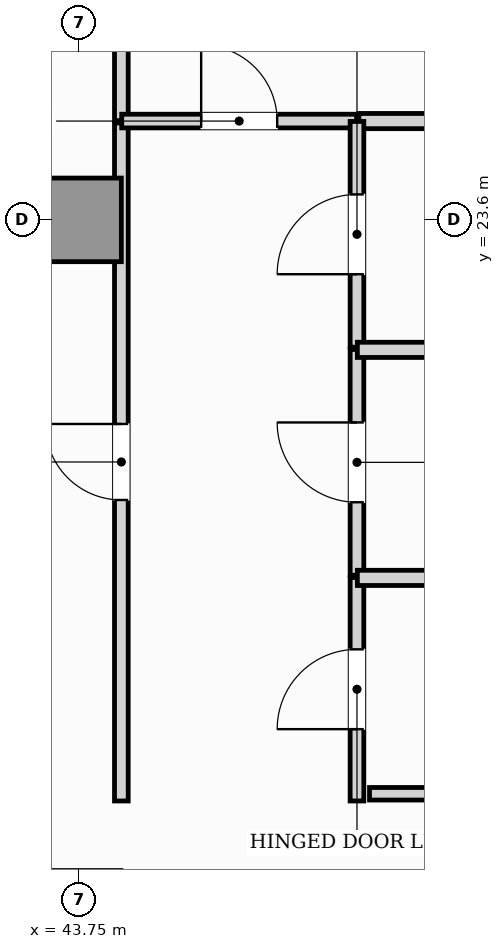
"""IFC4 building model, lengths in metres.
Left out: names, types, materials, properties, quantities, classifications, styles, units other than length and angle.
Written with IfcOpenShell. Run it as: python <this file> out.ifc"""

import sys

from ifc_helpers import new_model, si_unit, direction, frame, frame_2d, origin, origin_2d, place, context, subcontext, project, spatial, rectangle, extrude, element, fill, save


model = new_model("IFC4")
c1 = context("Model", 3, precision=1e-05, world=origin(), true_north=direction((0.0, 1.0)))
c2 = subcontext(c1, "Body", "Model", "MODEL_VIEW")
j1 = project(units=[si_unit("LENGTHUNIT", "METRE"), si_unit("PLANEANGLEUNIT", "RADIAN")], contexts=[c1])
p1 = place(None, origin())
s1 = spatial("IfcSite", under=j1, at=p1, CompositionType="ELEMENT")
p2 = place(p1, origin())
s2 = spatial("IfcBuilding", under=s1, at=p2, CompositionType="ELEMENT")
p3 = place(p2, origin())
s3 = spatial("IfcBuildingStorey", under=s2, at=p3, CompositionType="ELEMENT", Elevation=0.0)
p4 = place(p3, frame((43.75, 23.6, 0.0), z_axis=(0.0, 0.0, 1.0), x_axis=(1.0, 0.0, 0.0)))
e1 = element("IfcColumn", 1, at=p4, inside=s3, PredefinedType="COLUMN", context=c2, shape_type="SweptSolid", body=[
    extrude(rectangle(XDim=1.1, YDim=1.1, at=origin_2d()), origin(), (0.0, 0.0, 1.0), 5.4),
])
p5 = place(p3, frame((44.3, 24.905, 0.0), z_axis=(0.0, 0.0, 1.0), x_axis=(0.0, 1.0, 0.0)))
e2 = element("IfcWall", 2, at=p5, inside=s3, PredefinedType="PARTITIONING", context=c2, shape_type="SweptSolid", body=[
    extrude(rectangle(XDim=18.59, YDim=0.18, at=frame_2d((9.295, 0.0))), origin(), (0.0, 0.0, 1.0), 5.1),
])
p6 = place(p5, frame((6.007, 0.0, 0.0)))
e3 = element("IfcOpeningElement", 3, at=p6, cuts=e2, PredefinedType="OPENING", context=c2, shape_type="SweptSolid", body=[
    extrude(rectangle(XDim=1.0, YDim=2.15, at=frame_2d((0.5, 1.075))), frame((0.0, 0.1, 0.0), z_axis=(0.0, -1.0, 0.0), x_axis=(1.0, 0.0, 0.0)), (0.0, 0.0, 1.0), 0.2),
])
p7 = place(p3, frame((44.3, 15.955, 0.0), z_axis=(0.0, 0.0, 1.0), x_axis=(0.0, 1.0, 0.0)))
e4 = element("IfcWall", 4, at=p7, inside=s3, PredefinedType="PARTITIONING", context=c2, shape_type="SweptSolid", body=[
    extrude(rectangle(XDim=8.92, YDim=0.18, at=frame_2d((4.46, 0.0))), origin(), (0.0, 0.0, 1.0), 5.1),
])
p8 = place(p7, frame((3.96, 0.0, 0.0)))
e5 = element("IfcOpeningElement", 5, at=p8, cuts=e4, PredefinedType="OPENING", context=c2, shape_type="SweptSolid", body=[
    extrude(rectangle(XDim=1.0, YDim=2.15, at=frame_2d((0.5, 1.075))), frame((0.0, 0.1, 0.0), z_axis=(0.0, -1.0, 0.0), x_axis=(1.0, 0.0, 0.0)), (0.0, 0.0, 1.0), 0.2),
])
p9 = place(p3, frame((44.305, 24.9, 0.0), z_axis=(0.0, 0.0, 1.0), x_axis=(1.0, 0.0, 0.0)))
e6 = element("IfcWall", 6, at=p9, inside=s3, PredefinedType="PARTITIONING", context=c2, shape_type="SweptSolid", body=[
    extrude(rectangle(XDim=3.09, YDim=0.18, at=frame_2d((1.545, 0.0))), origin(), (0.0, 0.0, 1.0), 5.1),
])
p10 = place(p9, frame((1.045, 0.0, 0.0)))
e7 = element("IfcOpeningElement", 7, at=p10, cuts=e6, PredefinedType="OPENING", context=c2, shape_type="SweptSolid", body=[
    extrude(rectangle(XDim=1.0, YDim=2.15, at=frame_2d((0.5, 1.075))), frame((0.0, 0.1, 0.0), z_axis=(0.0, -1.0, 0.0), x_axis=(1.0, 0.0, 0.0)), (0.0, 0.0, 1.0), 0.2),
])
p11 = place(p3, frame((47.425, 24.9, 0.0), z_axis=(0.0, 0.0, 1.0), x_axis=(1.0, 0.0, 0.0)))
e8 = element("IfcWall", 8, at=p11, inside=s3, PredefinedType="PARTITIONING", context=c2, shape_type="SweptSolid", body=[
    extrude(rectangle(XDim=7.85, YDim=0.2, at=frame_2d((3.925, 0.0))), origin(), (0.0, 0.0, 1.0), 5.1),
])
p12 = place(p3, frame((47.4, 15.955, 0.0), z_axis=(0.0, 0.0, 1.0), x_axis=(0.0, 1.0, 0.0)))
e9 = element("IfcWall", 9, at=p12, inside=s3, PredefinedType="PARTITIONING", context=c2, shape_type="SweptSolid", body=[
    extrude(rectangle(XDim=2.94, YDim=0.18, at=frame_2d((1.47, 0.0))), origin(), (0.0, 0.0, 1.0), 5.1),
])
p13 = place(p12, frame((0.945, 0.0, 0.0)))
e10 = element("IfcOpeningElement", 10, at=p13, cuts=e9, PredefinedType="OPENING", context=c2, shape_type="SweptSolid", body=[
    extrude(rectangle(XDim=1.05, YDim=2.15, at=frame_2d((0.525, 1.075))), frame((0.0, 0.1, 0.0), z_axis=(0.0, -1.0, 0.0), x_axis=(1.0, 0.0, 0.0)), (0.0, 0.0, 1.0), 0.2),
])
p14 = place(p3, frame((47.4, 18.925, 0.0), z_axis=(0.0, 0.0, 1.0), x_axis=(0.0, 1.0, 0.0)))
e11 = element("IfcWall", 11, at=p14, inside=s3, PredefinedType="PARTITIONING", context=c2, shape_type="SweptSolid", body=[
    extrude(rectangle(XDim=2.97, YDim=0.18, at=frame_2d((1.485, 0.0))), origin(), (0.0, 0.0, 1.0), 5.1),
])
p15 = place(p14, frame((0.96, 0.0, 0.0)))
e12 = element("IfcOpeningElement", 12, at=p15, cuts=e11, PredefinedType="OPENING", context=c2, shape_type="SweptSolid", body=[
    extrude(rectangle(XDim=1.05, YDim=2.15, at=frame_2d((0.525, 1.075))), frame((0.0, 0.1, 0.0), z_axis=(0.0, -1.0, 0.0), x_axis=(1.0, 0.0, 0.0)), (0.0, 0.0, 1.0), 0.2),
])
p16 = place(p3, frame((47.4, 21.925, 0.0), z_axis=(0.0, 0.0, 1.0), x_axis=(0.0, 1.0, 0.0)))
e13 = element("IfcWall", 13, at=p16, inside=s3, PredefinedType="PARTITIONING", context=c2, shape_type="SweptSolid", body=[
    extrude(rectangle(XDim=2.97, YDim=0.18, at=frame_2d((1.485, 0.0))), origin(), (0.0, 0.0, 1.0), 5.1),
])
p17 = place(p16, frame((0.96, 0.0, 0.0)))
e14 = element("IfcOpeningElement", 14, at=p17, cuts=e13, PredefinedType="OPENING", context=c2, shape_type="SweptSolid", body=[
    extrude(rectangle(XDim=1.05, YDim=2.15, at=frame_2d((0.525, 1.075))), frame((0.0, 0.1, 0.0), z_axis=(0.0, -1.0, 0.0), x_axis=(1.0, 0.0, 0.0)), (0.0, 0.0, 1.0), 0.2),
])
for number, where, z_axis, x_axis in (
    (15, (47.405, 18.89, 0.0), (0.0, 0.0, 1.0), (1.0, 0.0, 0.0)),
    (16, (47.405, 21.89, 0.0), (0.0, 0.0, 1.0), (1.0, 0.0, 0.0)),
):
    element("IfcWall", number, at=place(p3, frame(where, z_axis=z_axis, x_axis=x_axis)), inside=s3, PredefinedType="PARTITIONING", context=c2, shape_type="SweptSolid", body=[
        extrude(rectangle(XDim=7.89, YDim=0.2, at=frame_2d((3.945, 0.0))), origin(), (0.0, 0.0, 1.0), 5.1),
    ])
p18 = place(p3, frame((47.565, 16.05, 0.0), z_axis=(0.0, 0.0, 1.0), x_axis=(1.0, 0.0, 0.0)))
e17 = element("IfcWall", 17, at=p18, inside=s3, PredefinedType="PLUMBINGWALL", context=c2, shape_type="SweptSolid", body=[
    extrude(rectangle(XDim=1.645, YDim=0.165, at=frame_2d((0.823, 0.0))), origin(), (0.0, 0.0, 1.0), 5.1),
])
p19 = place(p8, origin())
e18 = element("IfcDoor", 18, at=p19, inside=s3, OperationType="SINGLE_SWING_RIGHT", PredefinedType="DOOR", context=c2, shape_type="SweptSolid", body=[
    extrude(rectangle(XDim=1.0, YDim=2.15, at=frame_2d((0.5, 1.075))), frame((0.0, 0.025, 0.0), z_axis=(0.0, -1.0, 0.0), x_axis=(1.0, 0.0, 0.0)), (0.0, 0.0, 1.0), 0.05),
])
fill(e5, e18)
p20 = place(p10, origin())
e19 = element("IfcDoor", 19, at=p20, inside=s3, OperationType="SINGLE_SWING_LEFT", PredefinedType="DOOR", context=c2, shape_type="SweptSolid", body=[
    extrude(rectangle(XDim=1.0, YDim=2.15, at=frame_2d((0.5, 1.075))), frame((0.0, 0.025, 0.0), z_axis=(0.0, -1.0, 0.0), x_axis=(1.0, 0.0, 0.0)), (0.0, 0.0, 1.0), 0.05),
])
fill(e7, e19)
p21 = place(p13, origin())
e20 = element("IfcDoor", 20, at=p21, inside=s3, OperationType="SINGLE_SWING_LEFT", PredefinedType="DOOR", context=c2, shape_type="SweptSolid", body=[
    extrude(rectangle(XDim=1.05, YDim=2.15, at=frame_2d((0.525, 1.075))), frame((0.0, 0.025, 0.0), z_axis=(0.0, -1.0, 0.0), x_axis=(1.0, 0.0, 0.0)), (0.0, 0.0, 1.0), 0.05),
])
fill(e10, e20)
p22 = place(p15, origin())
e21 = element("IfcDoor", 21, at=p22, inside=s3, OperationType="SINGLE_SWING_RIGHT", PredefinedType="DOOR", context=c2, shape_type="SweptSolid", body=[
    extrude(rectangle(XDim=1.05, YDim=2.15, at=frame_2d((0.525, 1.075))), frame((0.0, 0.025, 0.0), z_axis=(0.0, -1.0, 0.0), x_axis=(1.0, 0.0, 0.0)), (0.0, 0.0, 1.0), 0.05),
])
fill(e12, e21)
p23 = place(p17, origin())
e22 = element("IfcDoor", 22, at=p23, inside=s3, OperationType="SINGLE_SWING_LEFT", PredefinedType="DOOR", context=c2, shape_type="SweptSolid", body=[
    extrude(rectangle(XDim=1.05, YDim=2.15, at=frame_2d((0.525, 1.075))), frame((0.0, 0.025, 0.0), z_axis=(0.0, -1.0, 0.0), x_axis=(1.0, 0.0, 0.0)), (0.0, 0.0, 1.0), 0.05),
])
fill(e14, e22)
save(model, sys.argv[1])
